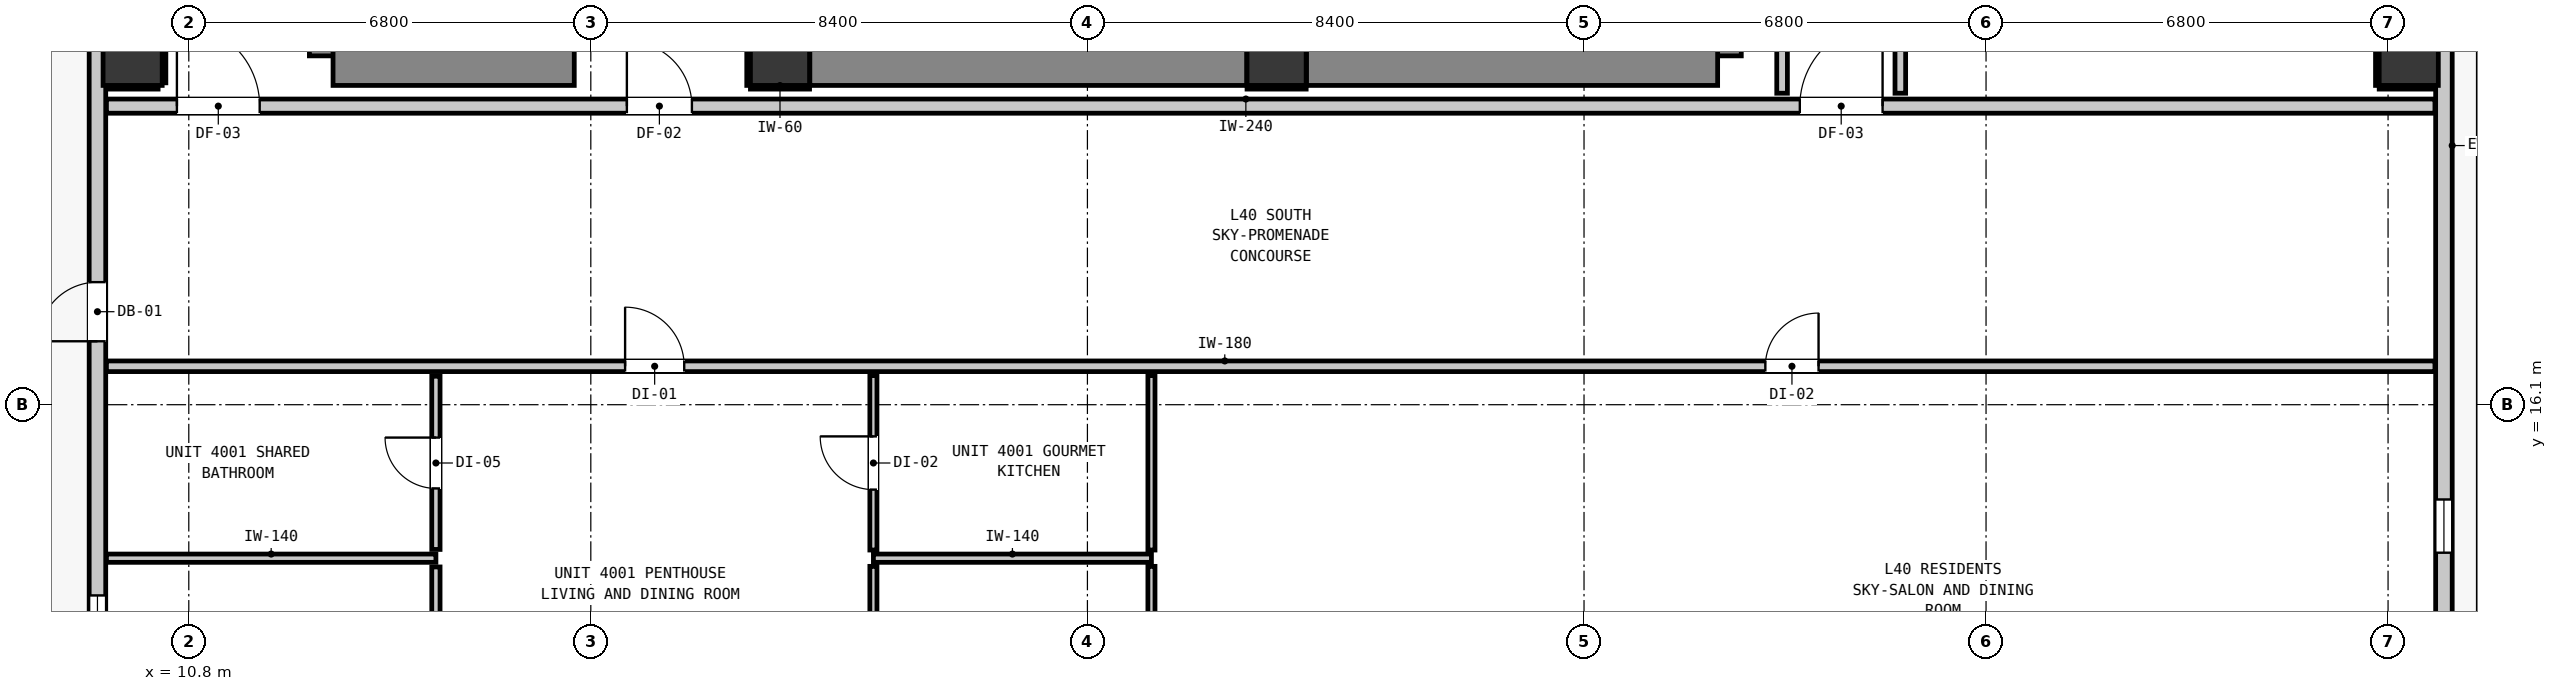
"""IFC4 building model, lengths in metres.
Left out: names, types, materials, properties, quantities, classifications, styles, units other than length and angle.
Written with IfcOpenShell. Run it as: python <this file> out.ifc"""

import sys

from ifc_helpers import new_model, si_unit, direction, frame, frame_2d, origin, origin_2d, place, context, subcontext, project, spatial, rectangle, extrude, element, fill, save


model = new_model("IFC4")
c1 = context("Model", 3, precision=1e-05, world=origin(), true_north=direction((0.0, 1.0)))
c2 = subcontext(c1, "Body", "Model", "MODEL_VIEW")
j1 = project(units=[si_unit("LENGTHUNIT", "METRE"), si_unit("PLANEANGLEUNIT", "RADIAN")], contexts=[c1])
p1 = place(None, origin())
s1 = spatial("IfcSite", under=j1, at=p1, CompositionType="ELEMENT")
p2 = place(p1, origin())
s2 = spatial("IfcBuilding", under=s1, at=p2, CompositionType="ELEMENT")
p3 = place(p2, frame((0.0, 0.0, 139.28)))
s3 = spatial("IfcBuildingStorey", under=s2, at=p3, CompositionType="ELEMENT", Elevation=139.28)
for number, where, z_axis, x_axis in (
    (1, (20.8, 22.0, 0.0), (0.0, 0.0, 1.0), (1.0, 0.0, 0.0)),
    (2, (29.2, 22.0, 0.0), (0.0, 0.0, 1.0), (1.0, 0.0, 0.0)),
):
    element("IfcColumn", number, at=place(p3, frame(where, z_axis=z_axis, x_axis=x_axis)), inside=s3, PredefinedType="COLUMN", context=c2, shape_type="SweptSolid", body=[
        extrude(rectangle(XDim=1.0, YDim=1.0, at=origin_2d()), origin(), (0.0, 0.0, 1.0), 3.32),
    ])
p4 = place(p3, frame((13.34, 22.0, 0.0), z_axis=(0.0, 0.0, 1.0), x_axis=(0.0, 1.0, 0.0)))
e3 = element("IfcWall", 3, at=p4, inside=s3, PredefinedType="SHEAR", context=c2, shape_type="SweptSolid", body=[
    extrude(rectangle(XDim=8.195, YDim=1.0, at=frame_2d((4.098, 0.0))), origin(), (0.0, 0.0, 1.0), 3.32),
])
p5 = place(p3, frame((13.24, 22.0, 0.0), z_axis=(0.0, 0.0, 1.0), x_axis=(1.0, 0.0, 0.0)))
e4 = element("IfcWall", 4, at=p5, inside=s3, PredefinedType="SHEAR", context=c2, shape_type="SweptSolid", body=[
    extrude(rectangle(XDim=4.08, YDim=1.0, at=frame_2d((2.04, 0.0))), origin(), (0.0, 0.0, 1.0), 3.32),
])
p6 = place(p3, frame((36.56, 22.0, 0.0), z_axis=(0.0, 0.0, 1.0), x_axis=(0.0, 1.0, 0.0)))
e5 = element("IfcWall", 5, at=p6, inside=s3, PredefinedType="SHEAR", context=c2, shape_type="SweptSolid", body=[
    extrude(rectangle(XDim=8.195, YDim=1.0, at=frame_2d((4.098, 0.0))), origin(), (0.0, 0.0, 1.0), 3.32),
])
p7 = place(p3, frame((29.705, 22.0, 0.0), z_axis=(0.0, 0.0, 1.0), x_axis=(1.0, 0.0, 0.0)))
e6 = element("IfcWall", 6, at=p7, inside=s3, PredefinedType="SHEAR", context=c2, shape_type="SweptSolid", body=[
    extrude(rectangle(XDim=6.955, YDim=1.0, at=frame_2d((3.478, 0.0))), origin(), (0.0, 0.0, 1.0), 3.32),
])
p8 = place(p3, frame((21.305, 22.0, 0.0), z_axis=(0.0, 0.0, 1.0), x_axis=(1.0, 0.0, 0.0)))
e7 = element("IfcWall", 7, at=p8, inside=s3, PredefinedType="SHEAR", context=c2, shape_type="SweptSolid", body=[
    extrude(rectangle(XDim=7.39, YDim=1.0, at=frame_2d((3.695, 0.0))), origin(), (0.0, 0.0, 1.0), 3.32),
])
for number, where, z_axis, x_axis in (
    (8, (9.85, 22.0, 0.0), (0.0, 0.0, 1.0), (1.0, 0.0, 0.0)),
    (9, (48.35, 22.0, 0.0), (0.0, 0.0, 1.0), (1.0, 0.0, 0.0)),
):
    element("IfcColumn", number, at=place(p3, frame(where, z_axis=z_axis, x_axis=x_axis)), inside=s3, PredefinedType="COLUMN", context=c2, shape_type="SweptSolid", body=[
        extrude(rectangle(XDim=1.0, YDim=1.0, at=origin_2d()), origin(), (0.0, 0.0, 1.0), 3.32),
    ])
p9 = place(p3, frame((9.255, 11.355, 0.0), z_axis=(0.0, 0.0, 1.0), x_axis=(0.0, 1.0, 0.0)))
e10 = element("IfcWall", 10, at=p9, inside=s3, PredefinedType="STANDARD", context=c2, shape_type="SweptSolid", body=[
    extrude(rectangle(XDim=32.29, YDim=0.28, at=frame_2d((16.145, 0.0))), origin(), (0.0, 0.0, 1.0), 3.08),
])
p10 = place(p9, frame((5.818, 0.0, 0.0)))
e11 = element("IfcOpeningElement", 11, at=p10, cuts=e10, PredefinedType="OPENING", context=c2, shape_type="SweptSolid", body=[
    extrude(rectangle(XDim=1.0, YDim=2.15, at=frame_2d((0.5, 1.075))), frame((0.0, 0.15, 0.0), z_axis=(0.0, -1.0, 0.0), x_axis=(1.0, 0.0, 0.0)), (0.0, 0.0, 1.0), 0.3),
])
p11 = place(p9, frame((0.619, 0.0, 0.85)))
e12 = element("IfcOpeningElement", 12, at=p11, cuts=e10, PredefinedType="OPENING", context=c2, shape_type="SweptSolid", body=[
    extrude(rectangle(XDim=0.9, YDim=1.5, at=frame_2d((0.45, 0.75))), frame((0.0, 0.15, 0.0), z_axis=(0.0, -1.0, 0.0), x_axis=(1.0, 0.0, 0.0)), (0.0, 0.0, 1.0), 0.3),
])
p12 = place(p3, frame((48.945, 43.645, 0.0), z_axis=(0.0, 0.0, 1.0), x_axis=(0.0, -1.0, 0.0)))
e13 = element("IfcWall", 13, at=p12, inside=s3, PredefinedType="STANDARD", context=c2, shape_type="SweptSolid", body=[
    extrude(rectangle(XDim=32.29, YDim=0.28, at=frame_2d((16.145, 0.0))), origin(), (0.0, 0.0, 1.0), 3.08),
])
p13 = place(p12, frame((5.467, 0.0, 0.0)))
e14 = element("IfcOpeningElement", 14, at=p13, cuts=e13, PredefinedType="OPENING", context=c2, shape_type="SweptSolid", body=[
    extrude(rectangle(XDim=1.0, YDim=2.15, at=frame_2d((0.5, 1.075))), frame((0.0, 0.15, 0.0), z_axis=(0.0, -1.0, 0.0), x_axis=(1.0, 0.0, 0.0)), (0.0, 0.0, 1.0), 0.3),
])
p14 = place(p12, frame((29.148, 0.0, 0.85)))
e15 = element("IfcOpeningElement", 15, at=p14, cuts=e13, PredefinedType="OPENING", context=c2, shape_type="SweptSolid", body=[
    extrude(rectangle(XDim=0.9, YDim=1.5, at=frame_2d((0.45, 0.75))), frame((0.0, 0.15, 0.0), z_axis=(0.0, -1.0, 0.0), x_axis=(1.0, 0.0, 0.0)), (0.0, 0.0, 1.0), 0.3),
])
p15 = place(p12, frame((0.393, 0.0, 0.85)))
e16 = element("IfcOpeningElement", 16, at=p15, cuts=e13, PredefinedType="OPENING", context=c2, shape_type="SweptSolid", body=[
    extrude(rectangle(XDim=0.9, YDim=1.5, at=frame_2d((0.45, 0.75))), frame((0.0, 0.15, 0.0), z_axis=(0.0, -1.0, 0.0), x_axis=(1.0, 0.0, 0.0)), (0.0, 0.0, 1.0), 0.3),
])
p16 = place(p12, frame((16.276, 0.0, 0.85)))
e17 = element("IfcOpeningElement", 17, at=p16, cuts=e13, PredefinedType="OPENING", context=c2, shape_type="SweptSolid", body=[
    extrude(rectangle(XDim=0.9, YDim=1.5, at=frame_2d((0.45, 0.75))), frame((0.0, 0.15, 0.0), z_axis=(0.0, -1.0, 0.0), x_axis=(1.0, 0.0, 0.0)), (0.0, 0.0, 1.0), 0.3),
])
p17 = place(p12, frame((10.645, 0.0, 0.85)))
e18 = element("IfcOpeningElement", 18, at=p17, cuts=e13, PredefinedType="OPENING", context=c2, shape_type="SweptSolid", body=[
    extrude(rectangle(XDim=0.9, YDim=1.5, at=frame_2d((0.45, 0.75))), frame((0.0, 0.15, 0.0), z_axis=(0.0, -1.0, 0.0), x_axis=(1.0, 0.0, 0.0)), (0.0, 0.0, 1.0), 0.3),
])
p18 = place(p3, frame((9.407, 21.15, 0.0), z_axis=(0.0, 0.0, 1.0), x_axis=(1.0, 0.0, 0.0)))
e19 = element("IfcWall", 19, at=p18, inside=s3, PredefinedType="PARTITIONING", context=c2, shape_type="SweptSolid", body=[
    extrude(rectangle(XDim=39.386, YDim=0.24, at=frame_2d((19.693, 0.0))), origin(), (0.0, 0.0, 1.0), 3.08),
])
p19 = place(p18, frame((8.803, 0.0, 0.0)))
e20 = element("IfcOpeningElement", 20, at=p19, cuts=e19, PredefinedType="OPENING", context=c2, shape_type="SweptSolid", body=[
    extrude(rectangle(XDim=1.1, YDim=2.15, at=frame_2d((0.55, 1.075))), frame((0.0, 0.13, 0.0), z_axis=(0.0, -1.0, 0.0), x_axis=(1.0, 0.0, 0.0)), (0.0, 0.0, 1.0), 0.26),
])
p20 = place(p18, frame((1.192, 0.0, 0.0)))
e21 = element("IfcOpeningElement", 21, at=p20, cuts=e19, PredefinedType="OPENING", context=c2, shape_type="SweptSolid", body=[
    extrude(rectangle(XDim=1.4, YDim=2.15, at=frame_2d((0.7, 1.075))), frame((0.0, 0.13, 0.0), z_axis=(0.0, -1.0, 0.0), x_axis=(1.0, 0.0, 0.0)), (0.0, 0.0, 1.0), 0.26),
])
p21 = place(p18, frame((28.643, 0.0, 0.0)))
e22 = element("IfcOpeningElement", 22, at=p21, cuts=e19, PredefinedType="OPENING", context=c2, shape_type="SweptSolid", body=[
    extrude(rectangle(XDim=1.4, YDim=2.15, at=frame_2d((0.7, 1.075))), frame((0.0, 0.13, 0.0), z_axis=(0.0, -1.0, 0.0), x_axis=(1.0, 0.0, 0.0)), (0.0, 0.0, 1.0), 0.26),
])
p22 = place(p3, frame((9.407, 16.75, 0.0), z_axis=(0.0, 0.0, 1.0), x_axis=(1.0, 0.0, 0.0)))
e23 = element("IfcWall", 23, at=p22, inside=s3, PredefinedType="PARTITIONING", context=c2, shape_type="SweptSolid", body=[
    extrude(rectangle(XDim=39.386, YDim=0.18, at=frame_2d((19.693, 0.0))), origin(), (0.0, 0.0, 1.0), 3.08),
])
p23 = place(p22, frame((8.773, 0.0, 0.0)))
e24 = element("IfcOpeningElement", 24, at=p23, cuts=e23, PredefinedType="OPENING", context=c2, shape_type="SweptSolid", body=[
    extrude(rectangle(XDim=1.0, YDim=2.15, at=frame_2d((0.5, 1.075))), frame((0.0, 0.1, 0.0), z_axis=(0.0, -1.0, 0.0), x_axis=(1.0, 0.0, 0.0)), (0.0, 0.0, 1.0), 0.2),
])
p24 = place(p22, frame((28.06, 0.0, 0.0)))
e25 = element("IfcOpeningElement", 25, at=p24, cuts=e23, PredefinedType="OPENING", context=c2, shape_type="SweptSolid", body=[
    extrude(rectangle(XDim=0.9, YDim=2.1, at=frame_2d((0.45, 1.05))), frame((0.0, 0.1, 0.0), z_axis=(0.0, -1.0, 0.0), x_axis=(1.0, 0.0, 0.0)), (0.0, 0.0, 1.0), 0.2),
])
p25 = place(p3, frame((9.407, 13.504, 0.0), z_axis=(0.0, 0.0, 1.0), x_axis=(1.0, 0.0, 0.0)))
e26 = element("IfcWall", 26, at=p25, inside=s3, PredefinedType="PARTITIONING", context=c2, shape_type="SweptSolid", body=[
    extrude(rectangle(XDim=5.573, YDim=0.14, at=frame_2d((2.787, 0.0))), origin(), (0.0, 0.0, 1.0), 3.08),
])
p26 = place(p3, frame((22.38, 13.504, 0.0), z_axis=(0.0, 0.0, 1.0), x_axis=(1.0, 0.0, 0.0)))
e27 = element("IfcWall", 27, at=p26, inside=s3, PredefinedType="PARTITIONING", context=c2, shape_type="SweptSolid", body=[
    extrude(rectangle(XDim=4.703, YDim=0.14, at=frame_2d((2.352, 0.0))), origin(), (0.0, 0.0, 1.0), 3.08),
])
p27 = place(p3, frame((37.75, 21.368, 0.0), z_axis=(0.0, 0.0, 1.0), x_axis=(0.0, 1.0, 0.0)))
e28 = element("IfcWall", 28, at=p27, inside=s3, PredefinedType="PARTITIONING", context=c2, shape_type="SweptSolid", body=[
    extrude(rectangle(XDim=18.694, YDim=0.18, at=frame_2d((9.347, 0.0))), origin(), (0.0, 0.0, 1.0), 3.08),
])
p28 = place(p3, frame((39.75, 21.368, 0.0), z_axis=(0.0, 0.0, 1.0), x_axis=(0.0, 1.0, 0.0)))
e29 = element("IfcWall", 29, at=p28, inside=s3, PredefinedType="PARTITIONING", context=c2, shape_type="SweptSolid", body=[
    extrude(rectangle(XDim=3.193, YDim=0.18, at=frame_2d((1.597, 0.0))), origin(), (0.0, 0.0, 1.0), 3.08),
])
p29 = place(p3, frame((14.98, 9.207, 0.0), z_axis=(0.0, 0.0, 1.0), x_axis=(0.0, 1.0, 0.0)))
e30 = element("IfcWall", 30, at=p29, inside=s3, PredefinedType="PARTITIONING", context=c2, shape_type="SweptSolid", body=[
    extrude(rectangle(XDim=4.149, YDim=0.14, at=frame_2d((2.074, 0.0))), origin(), (0.0, 0.0, 1.0), 3.08),
])
p30 = place(p29, frame((1.708, 0.0, 0.0)))
e31 = element("IfcOpeningElement", 31, at=p30, cuts=e30, PredefinedType="OPENING", context=c2, shape_type="SweptSolid", body=[
    extrude(rectangle(XDim=0.9, YDim=2.1, at=frame_2d((0.45, 1.05))), frame((0.0, 0.08, 0.0), z_axis=(0.0, -1.0, 0.0), x_axis=(1.0, 0.0, 0.0)), (0.0, 0.0, 1.0), 0.16),
])
p31 = place(p3, frame((14.98, 13.652, 0.0), z_axis=(0.0, 0.0, 1.0), x_axis=(0.0, 1.0, 0.0)))
e32 = element("IfcWall", 32, at=p31, inside=s3, PredefinedType="PARTITIONING", context=c2, shape_type="SweptSolid", body=[
    extrude(rectangle(XDim=2.93, YDim=0.14, at=frame_2d((1.465, 0.0))), origin(), (0.0, 0.0, 1.0), 3.08),
])
p32 = place(p31, frame((1.032, 0.0, 0.0)))
e33 = element("IfcOpeningElement", 33, at=p32, cuts=e32, PredefinedType="OPENING", context=c2, shape_type="SweptSolid", body=[
    extrude(rectangle(XDim=0.86, YDim=2.02, at=frame_2d((0.43, 1.01))), frame((0.0, 0.08, 0.0), z_axis=(0.0, -1.0, 0.0), x_axis=(1.0, 0.0, 0.0)), (0.0, 0.0, 1.0), 0.16),
])
p33 = place(p3, frame((22.38, 9.207, 0.0), z_axis=(0.0, 0.0, 1.0), x_axis=(0.0, 1.0, 0.0)))
e34 = element("IfcWall", 34, at=p33, inside=s3, PredefinedType="PARTITIONING", context=c2, shape_type="SweptSolid", body=[
    extrude(rectangle(XDim=4.159, YDim=0.12, at=frame_2d((2.08, 0.0))), origin(), (0.0, 0.0, 1.0), 3.08),
])
p34 = place(p33, frame((1.708, 0.0, 0.0)))
e35 = element("IfcOpeningElement", 35, at=p34, cuts=e34, PredefinedType="OPENING", context=c2, shape_type="SweptSolid", body=[
    extrude(rectangle(XDim=0.9, YDim=2.1, at=frame_2d((0.45, 1.05))), frame((0.0, 0.07, 0.0), z_axis=(0.0, -1.0, 0.0), x_axis=(1.0, 0.0, 0.0)), (0.0, 0.0, 1.0), 0.14),
])
p35 = place(p3, frame((22.38, 13.642, 0.0), z_axis=(0.0, 0.0, 1.0), x_axis=(0.0, 1.0, 0.0)))
e36 = element("IfcWall", 36, at=p35, inside=s3, PredefinedType="PARTITIONING", context=c2, shape_type="SweptSolid", body=[
    extrude(rectangle(XDim=2.95, YDim=0.12, at=frame_2d((1.475, 0.0))), origin(), (0.0, 0.0, 1.0), 3.08),
])
p36 = place(p35, frame((1.022, 0.0, 0.0)))
e37 = element("IfcOpeningElement", 37, at=p36, cuts=e36, PredefinedType="OPENING", context=c2, shape_type="SweptSolid", body=[
    extrude(rectangle(XDim=0.9, YDim=2.1, at=frame_2d((0.45, 1.05))), frame((0.0, 0.07, 0.0), z_axis=(0.0, -1.0, 0.0), x_axis=(1.0, 0.0, 0.0)), (0.0, 0.0, 1.0), 0.14),
])
p37 = place(p3, frame((27.083, 9.207, 0.0), z_axis=(0.0, 0.0, 1.0), x_axis=(0.0, 1.0, 0.0)))
e38 = element("IfcWall", 38, at=p37, inside=s3, PredefinedType="PARTITIONING", context=c2, shape_type="SweptSolid", body=[
    extrude(rectangle(XDim=4.159, YDim=0.12, at=frame_2d((2.08, 0.0))), origin(), (0.0, 0.0, 1.0), 3.08),
])
p38 = place(p3, frame((27.083, 13.642, 0.0), z_axis=(0.0, 0.0, 1.0), x_axis=(0.0, 1.0, 0.0)))
e39 = element("IfcWall", 39, at=p38, inside=s3, PredefinedType="PARTITIONING", context=c2, shape_type="SweptSolid", body=[
    extrude(rectangle(XDim=2.95, YDim=0.12, at=frame_2d((1.475, 0.0))), origin(), (0.0, 0.0, 1.0), 3.08),
])
for number, where, z_axis, x_axis in (
    (40, (20.3, 21.468, 0.0), (0.0, 0.0, 1.0), (1.0, 0.0, 0.0)),
    (41, (20.268, 21.5, 0.0), (0.0, 0.0, 1.0), (0.0, 1.0, 0.0)),
    (42, (28.7, 21.468, 0.0), (0.0, 0.0, 1.0), (1.0, 0.0, 0.0)),
):
    element("IfcWall", number, at=place(p3, frame(where, z_axis=z_axis, x_axis=x_axis)), inside=s3, PredefinedType="PARTITIONING", context=c2, shape_type="SweptSolid", body=[
        extrude(rectangle(XDim=1.0, YDim=0.06, at=frame_2d((0.5, 0.0))), origin(), (0.0, 0.0, 1.0), 1.45),
    ])
p39 = place(p3, frame((9.41, 21.468, 0.0), z_axis=(0.0, 0.0, 1.0), x_axis=(1.0, 0.0, 0.0)))
e43 = element("IfcWall", 43, at=p39, inside=s3, PredefinedType="PARTITIONING", context=c2, shape_type="SweptSolid", body=[
    extrude(rectangle(XDim=0.871, YDim=0.06, at=frame_2d((0.436, 0.0))), origin(), (0.0, 0.0, 1.0), 1.45),
])
p40 = place(p3, frame((10.382, 21.544, 0.0), z_axis=(0.0, 0.0, 1.0), x_axis=(0.0, 1.0, 0.0)))
e44 = element("IfcWall", 44, at=p40, inside=s3, PredefinedType="PARTITIONING", context=c2, shape_type="SweptSolid", body=[
    extrude(rectangle(XDim=0.956, YDim=0.06, at=frame_2d((0.478, 0.0))), origin(), (0.0, 0.0, 1.0), 1.45),
])
p41 = place(p3, frame((47.85, 21.468, 0.0), z_axis=(0.0, 0.0, 1.0), x_axis=(1.0, 0.0, 0.0)))
e45 = element("IfcWall", 45, at=p41, inside=s3, PredefinedType="PARTITIONING", context=c2, shape_type="SweptSolid", body=[
    extrude(rectangle(XDim=0.94, YDim=0.06, at=frame_2d((0.47, 0.0))), origin(), (0.0, 0.0, 1.0), 1.45),
])
p42 = place(p3, frame((47.818, 21.5, 0.0), z_axis=(0.0, 0.0, 1.0), x_axis=(0.0, 1.0, 0.0)))
e46 = element("IfcWall", 46, at=p42, inside=s3, PredefinedType="PARTITIONING", context=c2, shape_type="SweptSolid", body=[
    extrude(rectangle(XDim=1.0, YDim=0.06, at=frame_2d((0.5, 0.0))), origin(), (0.0, 0.0, 1.0), 1.45),
])
p43 = place(p10, origin())
e47 = element("IfcDoor", 47, at=p43, inside=s3, OperationType="SINGLE_SWING_LEFT", PredefinedType="DOOR", context=c2, shape_type="SweptSolid", body=[
    extrude(rectangle(XDim=1.0, YDim=2.15, at=frame_2d((0.5, 1.075))), frame((0.0, 0.025, 0.0), z_axis=(0.0, -1.0, 0.0), x_axis=(1.0, 0.0, 0.0)), (0.0, 0.0, 1.0), 0.05),
])
fill(e11, e47)
p44 = place(p11, origin())
e48 = element("IfcWindow", 48, at=p44, inside=s3, PartitioningType="SINGLE_PANEL", PredefinedType="WINDOW", context=c2, shape_type="SweptSolid", body=[
    extrude(rectangle(XDim=0.9, YDim=1.5, at=frame_2d((0.45, 0.75))), frame((0.0, 0.03, 0.0), z_axis=(0.0, -1.0, 0.0), x_axis=(1.0, 0.0, 0.0)), (0.0, 0.0, 1.0), 0.06),
])
fill(e12, e48)
p45 = place(p14, origin())
e49 = element("IfcWindow", 49, at=p45, inside=s3, PartitioningType="SINGLE_PANEL", PredefinedType="WINDOW", context=c2, shape_type="SweptSolid", body=[
    extrude(rectangle(XDim=0.9, YDim=1.5, at=frame_2d((0.45, 0.75))), frame((0.0, 0.03, 0.0), z_axis=(0.0, -1.0, 0.0), x_axis=(1.0, 0.0, 0.0)), (0.0, 0.0, 1.0), 0.06),
])
fill(e15, e49)
p46 = place(p19, origin())
e50 = element("IfcDoor", 50, at=p46, inside=s3, OperationType="SINGLE_SWING_LEFT", PredefinedType="DOOR", context=c2, shape_type="SweptSolid", body=[
    extrude(rectangle(XDim=1.1, YDim=2.15, at=frame_2d((0.55, 1.075))), frame((0.0, 0.025, 0.0), z_axis=(0.0, -1.0, 0.0), x_axis=(1.0, 0.0, 0.0)), (0.0, 0.0, 1.0), 0.05),
])
fill(e20, e50)
p47 = place(p20, origin())
e51 = element("IfcDoor", 51, at=p47, inside=s3, OperationType="SINGLE_SWING_LEFT", PredefinedType="DOOR", context=c2, shape_type="SweptSolid", body=[
    extrude(rectangle(XDim=1.4, YDim=2.15, at=frame_2d((0.7, 1.075))), frame((0.0, 0.025, 0.0), z_axis=(0.0, -1.0, 0.0), x_axis=(1.0, 0.0, 0.0)), (0.0, 0.0, 1.0), 0.05),
])
fill(e21, e51)
p48 = place(p21, origin())
e52 = element("IfcDoor", 52, at=p48, inside=s3, OperationType="SINGLE_SWING_RIGHT", PredefinedType="DOOR", context=c2, shape_type="SweptSolid", body=[
    extrude(rectangle(XDim=1.4, YDim=2.15, at=frame_2d((0.7, 1.075))), frame((0.0, 0.025, 0.0), z_axis=(0.0, -1.0, 0.0), x_axis=(1.0, 0.0, 0.0)), (0.0, 0.0, 1.0), 0.05),
])
fill(e22, e52)
p49 = place(p23, origin())
e53 = element("IfcDoor", 53, at=p49, inside=s3, OperationType="SINGLE_SWING_LEFT", PredefinedType="DOOR", context=c2, shape_type="SweptSolid", body=[
    extrude(rectangle(XDim=1.0, YDim=2.15, at=frame_2d((0.5, 1.075))), frame((0.0, 0.025, 0.0), z_axis=(0.0, -1.0, 0.0), x_axis=(1.0, 0.0, 0.0)), (0.0, 0.0, 1.0), 0.05),
])
fill(e24, e53)
p50 = place(p32, origin())
e54 = element("IfcDoor", 54, at=p50, inside=s3, OperationType="SINGLE_SWING_RIGHT", PredefinedType="DOOR", context=c2, shape_type="SweptSolid", body=[
    extrude(rectangle(XDim=0.86, YDim=2.02, at=frame_2d((0.43, 1.01))), frame((0.0, 0.025, 0.0), z_axis=(0.0, -1.0, 0.0), x_axis=(1.0, 0.0, 0.0)), (0.0, 0.0, 1.0), 0.05),
])
fill(e33, e54)
p51 = place(p36, origin())
e55 = element("IfcDoor", 55, at=p51, inside=s3, OperationType="SINGLE_SWING_RIGHT", PredefinedType="DOOR", context=c2, shape_type="SweptSolid", body=[
    extrude(rectangle(XDim=0.9, YDim=2.1, at=frame_2d((0.45, 1.05))), frame((0.0, 0.025, 0.0), z_axis=(0.0, -1.0, 0.0), x_axis=(1.0, 0.0, 0.0)), (0.0, 0.0, 1.0), 0.05),
])
fill(e37, e55)
p52 = place(p24, origin())
e56 = element("IfcDoor", 56, at=p52, inside=s3, OperationType="SINGLE_SWING_RIGHT", PredefinedType="DOOR", context=c2, shape_type="SweptSolid", body=[
    extrude(rectangle(XDim=0.9, YDim=2.1, at=frame_2d((0.45, 1.05))), frame((0.0, 0.025, 0.0), z_axis=(0.0, -1.0, 0.0), x_axis=(1.0, 0.0, 0.0)), (0.0, 0.0, 1.0), 0.05),
])
fill(e25, e56)
save(model, sys.argv[1])
